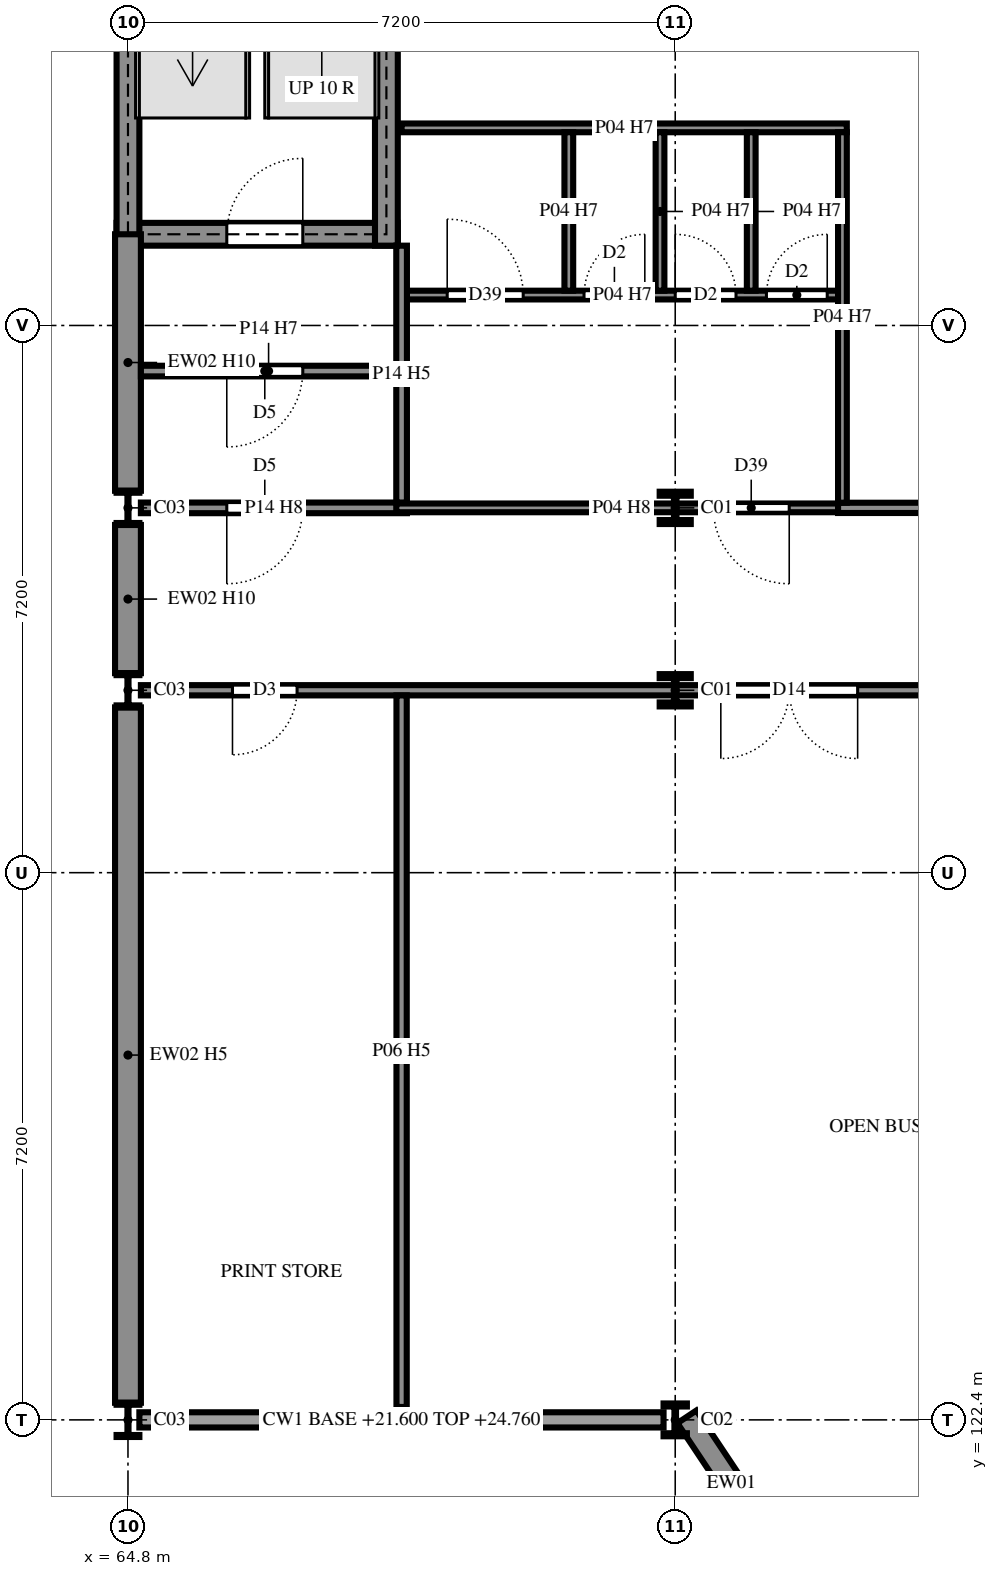
"""IFC4 building model, lengths in metres.
Left out: names, types, materials, properties, quantities, classifications, styles, units other than length and angle.
Written with IfcOpenShell. Run it as: python <this file> out.ifc"""

import sys

from ifc_helpers import new_model, si_unit, direction, frame, frame_2d, origin, origin_2d, place, context, subcontext, project, spatial, rectangle, i_section, extrude, element, fill, save


model = new_model("IFC4")
c1 = context("Model", 3, precision=1e-05, world=origin(), true_north=direction((0.0, 1.0)))
c2 = subcontext(c1, "Body", "Model", "MODEL_VIEW")
j1 = project(units=[si_unit("LENGTHUNIT", "METRE"), si_unit("PLANEANGLEUNIT", "RADIAN")], contexts=[c1])
p1 = place(None, origin())
s1 = spatial("IfcSite", under=j1, at=p1, CompositionType="ELEMENT")
p2 = place(p1, origin())
s2 = spatial("IfcBuilding", under=s1, at=p2, CompositionType="ELEMENT")
p3 = place(p2, frame((0.0, 0.0, 21.6)))
s3 = spatial("IfcBuildingStorey", under=s2, at=p3, CompositionType="ELEMENT", Elevation=21.6)
for number, where, z_axis, x_axis in (
    (1, (64.8, 122.4, 0.0), (0.0, 0.0, 1.0), (1.0, 0.0, 0.0)),
    (2, (64.8, 132.0, 0.0), (0.0, 0.0, 1.0), (1.0, 0.0, 0.0)),
    (3, (64.8, 134.4, 0.0), (0.0, 0.0, 1.0), (1.0, 0.0, 0.0)),
):
    element("IfcColumn", number, at=place(p3, frame(where, z_axis=z_axis, x_axis=x_axis)), inside=s3, PredefinedType="COLUMN", context=c2, shape_type="SweptSolid", body=[
        extrude(i_section(OverallWidth=0.3, OverallDepth=0.45, WebThickness=0.014, FlangeThickness=0.026, FilletRadius=0.027, at=origin_2d()), origin(), (0.0, 0.0, 1.0), 3.6),
    ])
p4 = place(p3, frame((72.0, 122.4, 0.0), z_axis=(0.0, 0.0, 1.0), x_axis=(1.0, 0.0, 0.0)))
e4 = element("IfcColumn", 4, at=p4, inside=s3, PredefinedType="COLUMN", context=c2, shape_type="SweptSolid", body=[
    extrude(i_section(OverallWidth=0.307, OverallDepth=0.432, WebThickness=0.021, FlangeThickness=0.04, FilletRadius=0.027, at=origin_2d()), origin(), (0.0, 0.0, 1.0), 3.6),
])
for number, where, z_axis, x_axis in (
    (5, (72.0, 132.0, 0.0), (0.0, 0.0, 1.0), (1.0, 0.0, 0.0)),
    (6, (72.0, 134.4, 0.0), (0.0, 0.0, 1.0), (1.0, 0.0, 0.0)),
):
    element("IfcColumn", number, at=place(p3, frame(where, z_axis=z_axis, x_axis=x_axis)), inside=s3, PredefinedType="COLUMN", context=c2, shape_type="SweptSolid", body=[
        extrude(i_section(OverallWidth=0.409, OverallDepth=0.425, WebThickness=0.033, FlangeThickness=0.052, FilletRadius=0.015, at=origin_2d()), origin(), (0.0, 0.0, 1.0), 3.6),
    ])
p5 = place(p3, frame((64.65, 138.0, 0.0), z_axis=(0.0, 0.0, 1.0), x_axis=(1.0, 0.0, 0.0)))
e7 = element("IfcWall", 7, at=p5, inside=s3, PredefinedType="SHEAR", context=c2, shape_type="SweptSolid", body=[
    extrude(rectangle(XDim=3.7, YDim=0.3, at=frame_2d((1.85, 0.0))), origin(), (0.0, 0.0, 1.0), 3.6),
])
p6 = place(p5, frame((1.45, 0.0, 0.0)))
e8 = element("IfcOpeningElement", 8, at=p6, cuts=e7, PredefinedType="OPENING", context=c2, shape_type="SweptSolid", body=[
    extrude(rectangle(XDim=1.0, YDim=2.1, at=frame_2d((0.5, 1.05))), frame((0.0, 0.16, 0.0), z_axis=(0.0, -1.0, 0.0), x_axis=(1.0, 0.0, 0.0)), (0.0, 0.0, 1.0), 0.32),
])
p7 = place(p3, frame((68.2, 137.85, 0.0), z_axis=(0.0, 0.0, 1.0), x_axis=(0.0, 1.0, 0.0)))
e9 = element("IfcWall", 9, at=p7, inside=s3, PredefinedType="SHEAR", context=c2, shape_type="SweptSolid", body=[
    extrude(rectangle(XDim=6.3, YDim=0.3, at=frame_2d((3.15, 0.0))), origin(), (0.0, 0.0, 1.0), 3.6),
])
p8 = place(p3, frame((64.8, 144.15, 0.0), z_axis=(0.0, 0.0, 1.0), x_axis=(0.0, -1.0, 0.0)))
e10 = element("IfcWall", 10, at=p8, inside=s3, PredefinedType="SHEAR", context=c2, shape_type="SweptSolid", body=[
    extrude(rectangle(XDim=6.3, YDim=0.3, at=frame_2d((3.15, 0.0))), origin(), (0.0, 0.0, 1.0), 3.6),
])
p9 = place(p8, frame((2.55, 0.0, 0.6)))
e11 = element("IfcOpeningElement", 11, at=p9, cuts=e10, PredefinedType="OPENING", context=c2, shape_type="SweptSolid", body=[
    extrude(rectangle(XDim=0.9, YDim=2.1, at=frame_2d((0.45, 1.05))), frame((0.0, 0.16, 0.0), z_axis=(0.0, -1.0, 0.0), x_axis=(1.0, 0.0, 0.0)), (0.0, 0.0, 1.0), 0.32),
])
p10 = place(p3, frame((64.8, 138.0, 0.0), z_axis=(0.0, 0.0, 1.0), x_axis=(0.0, -1.0, 0.0)))
e12 = element("IfcWall", 12, at=p10, inside=s3, PredefinedType="SOLIDWALL", context=c2, shape_type="SweptSolid", body=[
    extrude(rectangle(XDim=3.375, YDim=0.34, at=frame_2d((1.688, 0.0))), origin(), (0.0, 0.0, 1.0), 3.26),
])
p11 = place(p3, frame((64.8, 134.175, 0.0), z_axis=(0.0, 0.0, 1.0), x_axis=(0.0, -1.0, 0.0)))
e13 = element("IfcWall", 13, at=p11, inside=s3, PredefinedType="SOLIDWALL", context=c2, shape_type="SweptSolid", body=[
    extrude(rectangle(XDim=1.95, YDim=0.34, at=frame_2d((0.975, 0.0))), origin(), (0.0, 0.0, 1.0), 3.26),
])
p12 = place(p3, frame((64.8, 131.775, 0.0), z_axis=(0.0, 0.0, 1.0), x_axis=(0.0, -1.0, 0.0)))
e14 = element("IfcWall", 14, at=p12, inside=s3, PredefinedType="SOLIDWALL", context=c2, shape_type="SweptSolid", body=[
    extrude(rectangle(XDim=9.15, YDim=0.34, at=frame_2d((4.575, 0.0))), origin(), (0.0, 0.0, 1.0), 3.06),
])
p13 = place(p3, frame((72.154, 122.44, 0.0), z_axis=(0.0, 0.0, 1.0), x_axis=(0.554620150341, -0.8321036527, 0.0)))
e15 = element("IfcWall", 15, at=p13, inside=s3, PredefinedType="SOLIDWALL", context=c2, shape_type="SweptSolid", body=[
    extrude(rectangle(XDim=2.112, YDim=0.3, at=frame_2d((1.056, 0.0))), origin(), (0.0, 0.0, 1.0), 3.22),
])
p14 = place(p3, frame((64.97, 132.0, 0.0), z_axis=(0.0, 0.0, 1.0), x_axis=(1.0, 0.0, 0.0)))
e16 = element("IfcWall", 16, at=p14, inside=s3, PredefinedType="PARTITIONING", context=c2, shape_type="SweptSolid", body=[
    extrude(rectangle(XDim=28.43, YDim=0.135, at=frame_2d((14.215, 0.0))), origin(), (0.0, 0.0, 1.0), 3.16),
])
p15 = place(p14, frame((1.205, 0.0, 0.0)))
e17 = element("IfcOpeningElement", 17, at=p15, cuts=e16, PredefinedType="OPENING", context=c2, shape_type="SweptSolid", body=[
    extrude(rectangle(XDim=0.85, YDim=2.1, at=frame_2d((0.425, 1.05))), frame((0.0, 0.077, 0.0), z_axis=(0.0, -1.0, 0.0), x_axis=(1.0, 0.0, 0.0)), (0.0, 0.0, 1.0), 0.155),
])
p16 = place(p14, frame((7.63, 0.0, 0.0)))
e18 = element("IfcOpeningElement", 18, at=p16, cuts=e16, PredefinedType="OPENING", context=c2, shape_type="SweptSolid", body=[
    extrude(rectangle(XDim=1.8, YDim=2.1, at=frame_2d((0.9, 1.05))), frame((0.0, 0.077, 0.0), z_axis=(0.0, -1.0, 0.0), x_axis=(1.0, 0.0, 0.0)), (0.0, 0.0, 1.0), 0.155),
])
p17 = place(p14, frame((15.13, 0.0, 0.0)))
e19 = element("IfcOpeningElement", 19, at=p17, cuts=e16, PredefinedType="OPENING", context=c2, shape_type="SweptSolid", body=[
    extrude(rectangle(XDim=1.8, YDim=2.1, at=frame_2d((0.9, 1.05))), frame((0.0, 0.077, 0.0), z_axis=(0.0, -1.0, 0.0), x_axis=(1.0, 0.0, 0.0)), (0.0, 0.0, 1.0), 0.155),
])
p18 = place(p14, frame((23.53, 0.0, 0.0)))
e20 = element("IfcOpeningElement", 20, at=p18, cuts=e16, PredefinedType="OPENING", context=c2, shape_type="SweptSolid", body=[
    extrude(rectangle(XDim=1.8, YDim=2.1, at=frame_2d((0.9, 1.05))), frame((0.0, 0.077, 0.0), z_axis=(0.0, -1.0, 0.0), x_axis=(1.0, 0.0, 0.0)), (0.0, 0.0, 1.0), 0.155),
])
p19 = place(p3, frame((64.97, 134.4, 0.0), z_axis=(0.0, 0.0, 1.0), x_axis=(1.0, 0.0, 0.0)))
e21 = element("IfcWall", 21, at=p19, inside=s3, PredefinedType="PARTITIONING", context=c2, shape_type="SweptSolid", body=[
    extrude(rectangle(XDim=3.5, YDim=0.14, at=frame_2d((1.75, 0.0))), origin(), (0.0, 0.0, 1.0), 3.16),
])
p20 = place(p19, frame((1.13, 0.0, 0.0)))
e22 = element("IfcOpeningElement", 22, at=p20, cuts=e21, PredefinedType="OPENING", context=c2, shape_type="SweptSolid", body=[
    extrude(rectangle(XDim=1.0, YDim=2.1, at=frame_2d((0.5, 1.05))), frame((0.0, 0.08, 0.0), z_axis=(0.0, -1.0, 0.0), x_axis=(1.0, 0.0, 0.0)), (0.0, 0.0, 1.0), 0.16),
])
p21 = place(p3, frame((68.33, 134.4, 0.0), z_axis=(0.0, 0.0, 1.0), x_axis=(1.0, 0.0, 0.0)))
e23 = element("IfcWall", 23, at=p21, inside=s3, PredefinedType="PARTITIONING", context=c2, shape_type="SweptSolid", body=[
    extrude(rectangle(XDim=5.927, YDim=0.115, at=frame_2d((2.964, 0.0))), origin(), (0.0, 0.0, 1.0), 3.16),
])
p22 = place(p21, frame((4.17, 0.0, 0.0)))
e24 = element("IfcOpeningElement", 24, at=p22, cuts=e23, PredefinedType="OPENING", context=c2, shape_type="SweptSolid", body=[
    extrude(rectangle(XDim=1.0, YDim=2.1, at=frame_2d((0.5, 1.05))), frame((0.0, 0.067, 0.0), z_axis=(0.0, -1.0, 0.0), x_axis=(1.0, 0.0, 0.0)), (0.0, 0.0, 1.0), 0.135),
])
p23 = place(p3, frame((74.143, 134.4, 0.0), z_axis=(0.0, 0.0, 1.0), x_axis=(1.0, 0.0, 0.0)))
e25 = element("IfcWall", 25, at=p23, inside=s3, PredefinedType="PARTITIONING", context=c2, shape_type="SweptSolid", body=[
    extrude(rectangle(XDim=19.257, YDim=0.135, at=frame_2d((9.629, 0.0))), origin(), (0.0, 0.0, 1.0), 3.16),
])
p24 = place(p23, frame((2.758, 0.0, 0.0)))
e26 = element("IfcOpeningElement", 26, at=p24, cuts=e25, PredefinedType="OPENING", context=c2, shape_type="SweptSolid", body=[
    extrude(rectangle(XDim=1.0, YDim=2.4, at=frame_2d((0.5, 1.2))), frame((0.0, 0.077, 0.0), z_axis=(0.0, -1.0, 0.0), x_axis=(1.0, 0.0, 0.0)), (0.0, 0.0, 1.0), 0.155),
])
p25 = place(p23, frame((15.357, 0.0, 0.0)))
e27 = element("IfcOpeningElement", 27, at=p25, cuts=e25, PredefinedType="OPENING", context=c2, shape_type="SweptSolid", body=[
    extrude(rectangle(XDim=1.0, YDim=2.4, at=frame_2d((0.5, 1.2))), frame((0.0, 0.077, 0.0), z_axis=(0.0, -1.0, 0.0), x_axis=(1.0, 0.0, 0.0)), (0.0, 0.0, 1.0), 0.155),
])
p26 = place(p3, frame((64.97, 136.2, 0.0), z_axis=(0.0, 0.0, 1.0), x_axis=(1.0, 0.0, 0.0)))
e28 = element("IfcWall", 28, at=p26, inside=s3, PredefinedType="PARTITIONING", context=c2, shape_type="SweptSolid", body=[
    extrude(rectangle(XDim=3.36, YDim=0.14, at=frame_2d((1.68, 0.0))), origin(), (0.0, 0.0, 1.0), 3.46),
])
p27 = place(p26, frame((1.13, 0.0, 0.0)))
e29 = element("IfcOpeningElement", 29, at=p27, cuts=e28, PredefinedType="OPENING", context=c2, shape_type="SweptSolid", body=[
    extrude(rectangle(XDim=1.0, YDim=2.1, at=frame_2d((0.5, 1.05))), frame((0.0, 0.08, 0.0), z_axis=(0.0, -1.0, 0.0), x_axis=(1.0, 0.0, 0.0)), (0.0, 0.0, 1.0), 0.16),
])
p28 = place(p3, frame((68.47, 137.2, 0.0), z_axis=(0.0, 0.0, 1.0), x_axis=(1.0, 0.0, 0.0)))
e30 = element("IfcWall", 30, at=p28, inside=s3, PredefinedType="PARTITIONING", context=c2, shape_type="SweptSolid", body=[
    extrude(rectangle(XDim=5.673, YDim=0.115, at=frame_2d((2.836, 0.0))), origin(), (0.0, 0.0, 1.0), 3.46),
])
p29 = place(p28, frame((0.53, 0.0, 0.0)))
e31 = element("IfcOpeningElement", 31, at=p29, cuts=e30, PredefinedType="OPENING", context=c2, shape_type="SweptSolid", body=[
    extrude(rectangle(XDim=1.0, YDim=2.1, at=frame_2d((0.5, 1.05))), frame((0.0, 0.067, 0.0), z_axis=(0.0, -1.0, 0.0), x_axis=(1.0, 0.0, 0.0)), (0.0, 0.0, 1.0), 0.135),
])
p30 = place(p28, frame((2.33, 0.0, 0.0)))
e32 = element("IfcOpeningElement", 32, at=p30, cuts=e30, PredefinedType="OPENING", context=c2, shape_type="SweptSolid", body=[
    extrude(rectangle(XDim=0.8, YDim=2.1, at=frame_2d((0.4, 1.05))), frame((0.0, 0.067, 0.0), z_axis=(0.0, -1.0, 0.0), x_axis=(1.0, 0.0, 0.0)), (0.0, 0.0, 1.0), 0.135),
])
p31 = place(p28, frame((3.53, 0.0, 0.0)))
e33 = element("IfcOpeningElement", 33, at=p31, cuts=e30, PredefinedType="OPENING", context=c2, shape_type="SweptSolid", body=[
    extrude(rectangle(XDim=0.8, YDim=2.1, at=frame_2d((0.4, 1.05))), frame((0.0, 0.067, 0.0), z_axis=(0.0, -1.0, 0.0), x_axis=(1.0, 0.0, 0.0)), (0.0, 0.0, 1.0), 0.135),
])
p32 = place(p28, frame((4.73, 0.0, 0.0)))
e34 = element("IfcOpeningElement", 34, at=p32, cuts=e30, PredefinedType="OPENING", context=c2, shape_type="SweptSolid", body=[
    extrude(rectangle(XDim=0.8, YDim=2.1, at=frame_2d((0.4, 1.05))), frame((0.0, 0.067, 0.0), z_axis=(0.0, -1.0, 0.0), x_axis=(1.0, 0.0, 0.0)), (0.0, 0.0, 1.0), 0.135),
])
p33 = place(p3, frame((68.4, 139.4, 0.0), z_axis=(0.0, 0.0, 1.0), x_axis=(1.0, 0.0, 0.0)))
e35 = element("IfcWall", 35, at=p33, inside=s3, PredefinedType="PARTITIONING", context=c2, shape_type="SweptSolid", body=[
    extrude(rectangle(XDim=5.858, YDim=0.115, at=frame_2d((2.929, 0.0))), origin(), (0.0, 0.0, 1.0), 3.46),
])
p34 = place(p3, frame((68.4, 122.57, 0.0), z_axis=(0.0, 0.0, 1.0), x_axis=(0.0, 1.0, 0.0)))
e36 = element("IfcWall", 36, at=p34, inside=s3, PredefinedType="PARTITIONING", context=c2, shape_type="SweptSolid", body=[
    extrude(rectangle(XDim=9.363, YDim=0.135, at=frame_2d((4.681, 0.0))), origin(), (0.0, 0.0, 1.0), 3.06),
])
p35 = place(p3, frame((68.4, 134.47, 0.0), z_axis=(0.0, 0.0, 1.0), x_axis=(0.0, 1.0, 0.0)))
e37 = element("IfcWall", 37, at=p35, inside=s3, PredefinedType="PARTITIONING", context=c2, shape_type="SweptSolid", body=[
    extrude(rectangle(XDim=3.38, YDim=0.14, at=frame_2d((1.69, 0.0))), origin(), (0.0, 0.0, 1.0), 3.06),
])
for number, where, z_axis, x_axis in (
    (38, (70.6, 137.258, 0.0), (0.0, 0.0, 1.0), (0.0, 1.0, 0.0)),
    (39, (71.8, 137.258, 0.0), (0.0, 0.0, 1.0), (0.0, 1.0, 0.0)),
    (40, (73.0, 137.258, 0.0), (0.0, 0.0, 1.0), (0.0, 1.0, 0.0)),
):
    element("IfcWall", number, at=place(p3, frame(where, z_axis=z_axis, x_axis=x_axis)), inside=s3, PredefinedType="PARTITIONING", context=c2, shape_type="SweptSolid", body=[
        extrude(rectangle(XDim=2.085, YDim=0.115, at=frame_2d((1.042, 0.0))), origin(), (0.0, 0.0, 1.0), 3.46),
    ])
p36 = place(p3, frame((74.2, 134.468, 0.0), z_axis=(0.0, 0.0, 1.0), x_axis=(0.0, 1.0, 0.0)))
e41 = element("IfcWall", 41, at=p36, inside=s3, PredefinedType="PARTITIONING", context=c2, shape_type="SweptSolid", body=[
    extrude(rectangle(XDim=4.875, YDim=0.115, at=frame_2d((2.438, 0.0))), origin(), (0.0, 0.0, 1.0), 3.46),
])
p37 = place(p15, frame((0.85, 0.0, 0.0), z_axis=(0.0, 0.0, 1.0), x_axis=(-1.0, 0.0, 0.0)))
e42 = element("IfcDoor", 42, at=p37, inside=s3, OperationType="SINGLE_SWING_LEFT", PredefinedType="DOOR", context=c2, shape_type="SweptSolid", body=[
    extrude(rectangle(XDim=0.85, YDim=2.1, at=frame_2d((0.425, 1.05))), frame((0.0, 0.025, 0.0), z_axis=(0.0, -1.0, 0.0), x_axis=(1.0, 0.0, 0.0)), (0.0, 0.0, 1.0), 0.05),
])
fill(e17, e42)
p38 = place(p16, frame((1.8, 0.0, 0.0), z_axis=(0.0, 0.0, 1.0), x_axis=(-1.0, 0.0, 0.0)))
e43 = element("IfcDoor", 43, at=p38, inside=s3, OperationType="DOUBLE_DOOR_SINGLE_SWING", PredefinedType="DOOR", context=c2, shape_type="SweptSolid", body=[
    extrude(rectangle(XDim=1.8, YDim=2.1, at=frame_2d((0.9, 1.05))), frame((0.0, 0.025, 0.0), z_axis=(0.0, -1.0, 0.0), x_axis=(1.0, 0.0, 0.0)), (0.0, 0.0, 1.0), 0.05),
])
fill(e18, e43)
p39 = place(p20, frame((1.0, 0.0, 0.0), z_axis=(0.0, 0.0, 1.0), x_axis=(-1.0, 0.0, 0.0)))
e44 = element("IfcDoor", 44, at=p39, inside=s3, OperationType="SINGLE_SWING_LEFT", PredefinedType="DOOR", context=c2, shape_type="SweptSolid", body=[
    extrude(rectangle(XDim=1.0, YDim=2.1, at=frame_2d((0.5, 1.05))), frame((0.0, 0.025, 0.0), z_axis=(0.0, -1.0, 0.0), x_axis=(1.0, 0.0, 0.0)), (0.0, 0.0, 1.0), 0.05),
])
fill(e22, e44)
p40 = place(p22, frame((1.0, 0.0, 0.0), z_axis=(0.0, 0.0, 1.0), x_axis=(-1.0, 0.0, 0.0)))
e45 = element("IfcDoor", 45, at=p40, inside=s3, OperationType="SINGLE_SWING_RIGHT", PredefinedType="DOOR", context=c2, shape_type="SweptSolid", body=[
    extrude(rectangle(XDim=1.0, YDim=2.1, at=frame_2d((0.5, 1.05))), frame((0.0, 0.025, 0.0), z_axis=(0.0, -1.0, 0.0), x_axis=(1.0, 0.0, 0.0)), (0.0, 0.0, 1.0), 0.05),
])
fill(e24, e45)
p41 = place(p27, frame((1.0, 0.0, 0.0), z_axis=(0.0, 0.0, 1.0), x_axis=(-1.0, 0.0, 0.0)))
e46 = element("IfcDoor", 46, at=p41, inside=s3, OperationType="SINGLE_SWING_LEFT", PredefinedType="DOOR", context=c2, shape_type="SweptSolid", body=[
    extrude(rectangle(XDim=1.0, YDim=2.1, at=frame_2d((0.5, 1.05))), frame((0.0, 0.025, 0.0), z_axis=(0.0, -1.0, 0.0), x_axis=(1.0, 0.0, 0.0)), (0.0, 0.0, 1.0), 0.05),
])
fill(e29, e46)
p42 = place(p29, origin())
e47 = element("IfcDoor", 47, at=p42, inside=s3, OperationType="SINGLE_SWING_RIGHT", PredefinedType="DOOR", context=c2, shape_type="SweptSolid", body=[
    extrude(rectangle(XDim=1.0, YDim=2.1, at=frame_2d((0.5, 1.05))), frame((0.0, 0.025, 0.0), z_axis=(0.0, -1.0, 0.0), x_axis=(1.0, 0.0, 0.0)), (0.0, 0.0, 1.0), 0.05),
])
fill(e31, e47)
p43 = place(p30, origin())
e48 = element("IfcDoor", 48, at=p43, inside=s3, OperationType="SINGLE_SWING_LEFT", PredefinedType="DOOR", context=c2, shape_type="SweptSolid", body=[
    extrude(rectangle(XDim=0.8, YDim=2.1, at=frame_2d((0.4, 1.05))), frame((0.0, 0.025, 0.0), z_axis=(0.0, -1.0, 0.0), x_axis=(1.0, 0.0, 0.0)), (0.0, 0.0, 1.0), 0.05),
])
fill(e32, e48)
p44 = place(p31, origin())
e49 = element("IfcDoor", 49, at=p44, inside=s3, OperationType="SINGLE_SWING_RIGHT", PredefinedType="DOOR", context=c2, shape_type="SweptSolid", body=[
    extrude(rectangle(XDim=0.8, YDim=2.1, at=frame_2d((0.4, 1.05))), frame((0.0, 0.025, 0.0), z_axis=(0.0, -1.0, 0.0), x_axis=(1.0, 0.0, 0.0)), (0.0, 0.0, 1.0), 0.05),
])
fill(e33, e49)
p45 = place(p32, origin())
e50 = element("IfcDoor", 50, at=p45, inside=s3, OperationType="SINGLE_SWING_LEFT", PredefinedType="DOOR", context=c2, shape_type="SweptSolid", body=[
    extrude(rectangle(XDim=0.8, YDim=2.1, at=frame_2d((0.4, 1.05))), frame((0.0, 0.025, 0.0), z_axis=(0.0, -1.0, 0.0), x_axis=(1.0, 0.0, 0.0)), (0.0, 0.0, 1.0), 0.05),
])
fill(e34, e50)
p46 = place(p6, origin())
e51 = element("IfcDoor", 51, at=p46, inside=s3, OperationType="SINGLE_SWING_LEFT", PredefinedType="DOOR", context=c2, shape_type="SweptSolid", body=[
    extrude(rectangle(XDim=1.0, YDim=2.1, at=frame_2d((0.5, 1.05))), frame((0.0, 0.025, 0.0), z_axis=(0.0, -1.0, 0.0), x_axis=(1.0, 0.0, 0.0)), (0.0, 0.0, 1.0), 0.05),
])
fill(e8, e51)
save(model, sys.argv[1])
